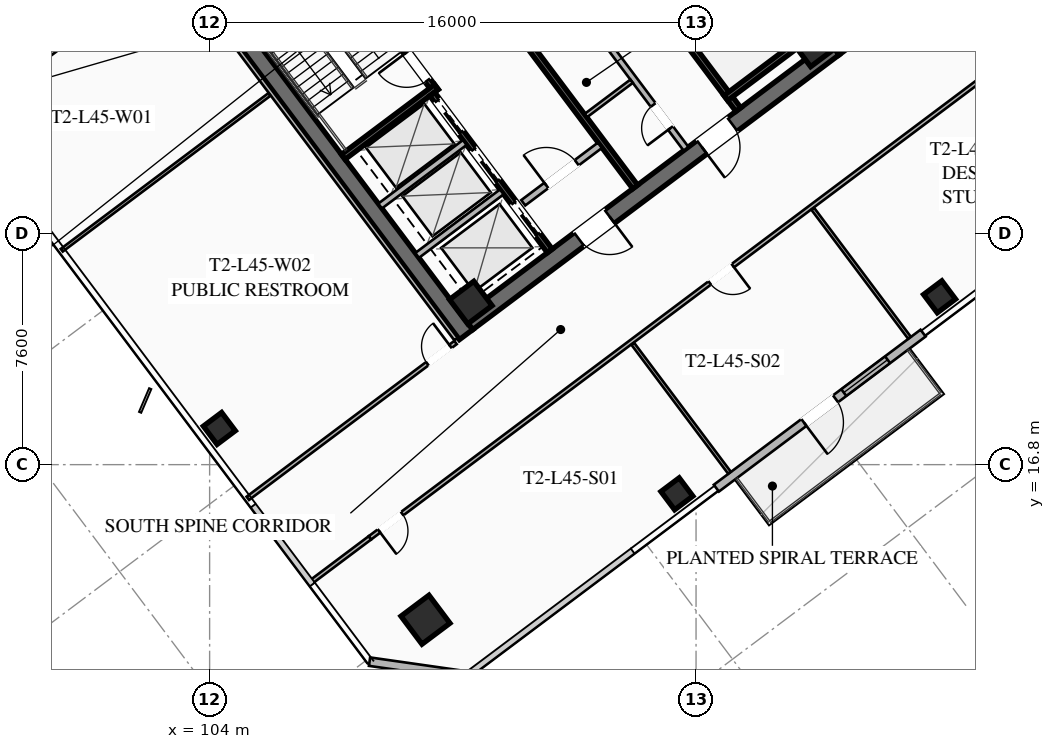
"""IFC4 building model, lengths in metres.
Left out: names, types, materials, properties, quantities, classifications, styles, units other than length and angle.
Written with IfcOpenShell. Run it as: python <this file> out.ifc"""

import sys

from ifc_helpers import new_model, si_unit, direction, frame, frame_2d, origin, origin_2d, place, context, subcontext, project, spatial, rectangle, hollow_rectangle, extrude, element, fill, save


model = new_model("IFC4")
c1 = context("Model", 3, precision=1e-05, world=origin(), true_north=direction((0.0, 1.0)))
c2 = subcontext(c1, "Body", "Model", "MODEL_VIEW")
j1 = project(units=[si_unit("LENGTHUNIT", "METRE"), si_unit("PLANEANGLEUNIT", "RADIAN")], contexts=[c1])
p1 = place(None, origin())
s1 = spatial("IfcSite", under=j1, at=p1, CompositionType="ELEMENT")
p2 = place(p1, origin())
s2 = spatial("IfcBuilding", under=s1, at=p2, CompositionType="ELEMENT")
p3 = place(p2, frame((0.0, 0.0, 167.65)))
s3 = spatial("IfcBuildingStorey", under=s2, at=p3, CompositionType="ELEMENT", Elevation=167.65)
for number, where, z_axis, x_axis in (
    (1, (112.436, 21.077, 0.0), (0.0, 0.0, 1.0), (-0.6, 0.8, 0.0)),
    (2, (115.564, 42.923, 0.0), (0.0, 0.0, 1.0), (0.6, -0.8, 0.0)),
):
    element("IfcWall", number, at=place(p3, frame(where, z_axis=z_axis, x_axis=x_axis)), inside=s3, PredefinedType="SHEAR", context=c2, shape_type="SweptSolid", body=[
        extrude(rectangle(XDim=15.6, YDim=0.55, at=frame_2d((7.8, 0.0))), origin(), (0.0, 0.0, 1.0), 3.55),
    ])
p4 = place(p3, frame((124.539, 30.498, 0.0), z_axis=(0.0, 0.0, 1.0), x_axis=(-0.799998054672, -0.600002593761, 0.0)))
e3 = element("IfcWall", 3, at=p4, inside=s3, PredefinedType="SHEAR", context=c2, shape_type="SweptSolid", body=[
    extrude(rectangle(XDim=15.06, YDim=0.55, at=frame_2d((7.53, 0.0))), origin(), (0.0, 0.0, 1.0), 3.55),
])
p5 = place(p4, frame((9.23, 0.0, 0.0)))
e4 = element("IfcOpeningElement", 4, at=p5, cuts=e3, PredefinedType="OPENING", context=c2, shape_type="SweptSolid", body=[
    extrude(rectangle(XDim=1.25, YDim=2.25, at=frame_2d((0.625, 1.125))), frame((0.0, 0.285, 0.0), z_axis=(0.0, -1.0, 0.0), x_axis=(1.0, 0.0, 0.0)), (0.0, 0.0, 1.0), 0.57),
])
p6 = place(p4, frame((4.18, 0.0, 0.0)))
e5 = element("IfcOpeningElement", 5, at=p6, cuts=e3, PredefinedType="OPENING", context=c2, shape_type="SweptSolid", body=[
    extrude(rectangle(XDim=1.25, YDim=2.25, at=frame_2d((0.625, 1.125))), frame((0.0, 0.285, 0.0), z_axis=(0.0, -1.0, 0.0), x_axis=(1.0, 0.0, 0.0)), (0.0, 0.0, 1.0), 0.57),
])
for number, where, z_axis, x_axis in (
    (6, (112.59, 22.13, 0.0), (0.0, 0.0, 1.0), (0.8, 0.6, 0.0)),
    (7, (123.87, 30.59, 0.0), (0.0, 0.0, 1.0), (0.8, 0.6, 0.0)),
):
    element("IfcColumn", number, at=place(p3, frame(where, z_axis=z_axis, x_axis=x_axis)), inside=s3, PredefinedType="COLUMN", context=c2, shape_type="SweptSolid", body=[
        extrude(hollow_rectangle(XDim=1.0, YDim=1.0, WallThickness=0.04, at=origin_2d()), origin(), (0.0, 0.0, 1.0), 3.37),
    ])
p7 = place(p3, frame((111.1, 11.7, 0.0), z_axis=(0.0, 0.0, 1.0), x_axis=(0.799999996291, 0.600000004945, 0.0)))
e8 = element("IfcColumn", 8, at=p7, inside=s3, PredefinedType="COLUMN", context=c2, shape_type="SweptSolid", body=[
    extrude(hollow_rectangle(XDim=1.15, YDim=1.15, WallThickness=0.045, at=origin_2d()), origin(), (0.0, 0.0, 1.0), 3.37),
])
for number, where, z_axis, x_axis in (
    (9, (119.37, 15.84, 0.0), (0.0, 0.0, 1.0), (0.8, 0.6, 0.0)),
    (10, (128.01, 22.32, 0.0), (0.0, 0.0, 1.0), (0.8, 0.6, 0.0)),
    (11, (104.32, 17.99, 0.0), (0.0, 0.0, 1.0), (0.8, 0.6, 0.0)),
):
    element("IfcColumn", number, at=place(p3, frame(where, z_axis=z_axis, x_axis=x_axis)), inside=s3, PredefinedType="COLUMN", context=c2, shape_type="SweptSolid", body=[
        extrude(hollow_rectangle(XDim=0.75, YDim=0.75, WallThickness=0.032, at=origin_2d()), origin(), (0.0, 0.0, 1.0), 3.37),
    ])
p8 = place(p3, frame((127.468, 21.126, 0.0), z_axis=(0.0, 0.0, 1.0), x_axis=(-0.799996553335, -0.600004595526, 0.0)))
e12 = element("IfcWall", 12, at=p8, inside=s3, PredefinedType="SOLIDWALL", context=c2, shape_type="SweptSolid", body=[
    extrude(rectangle(XDim=8.5, YDim=0.28, at=frame_2d((4.25, 0.0))), origin(), (0.0, 0.0, 1.0), 3.37),
])
p9 = place(p8, frame((3.6, 0.0, 0.0)))
e13 = element("IfcOpeningElement", 13, at=p9, cuts=e12, PredefinedType="OPENING", context=c2, shape_type="SweptSolid", body=[
    extrude(rectangle(XDim=1.3, YDim=2.15, at=frame_2d((0.65, 1.075))), frame((0.0, 0.15, 0.0), z_axis=(0.0, -1.0, 0.0), x_axis=(1.0, 0.0, 0.0)), (0.0, 0.0, 1.0), 0.3),
])
p10 = place(p8, frame((1.46, 0.0, 0.85)))
e14 = element("IfcOpeningElement", 14, at=p10, cuts=e12, PredefinedType="OPENING", context=c2, shape_type="SweptSolid", body=[
    extrude(rectangle(XDim=1.8, YDim=1.92, at=frame_2d((0.9, 0.96))), frame((0.0, 0.15, 0.0), z_axis=(0.0, -1.0, 0.0), x_axis=(1.0, 0.0, 0.0)), (0.0, 0.0, 1.0), 0.3),
])
p11 = place(p3, frame((112.48, 9.86, 0.0), z_axis=(0.0, 0.0, 1.0), x_axis=(-0.989950994782, 0.141410847992, 0.0)))
e15 = element("IfcWall", 15, at=p11, inside=s3, PredefinedType="SOLIDWALL", context=c2, shape_type="SweptSolid", body=[
    extrude(rectangle(XDim=3.253, YDim=0.28, at=frame_2d((1.626, 0.0))), origin(), (0.0, 0.0, 1.0), 3.37),
])
p12 = place(p3, frame((111.44, 29.08, 0.0), z_axis=(0.0, 0.0, 1.0), x_axis=(-0.59999029481, 0.8000072788, 0.0)))
e16 = element("IfcWall", 16, at=p12, inside=s3, PredefinedType="SHEAR", context=c2, shape_type="SweptSolid", body=[
    extrude(rectangle(XDim=8.05, YDim=0.2, at=frame_2d((4.025, 0.0))), origin(), (0.0, 0.0, 1.0), 3.37),
])
p13 = place(p12, frame((0.45, 0.0, 0.0)))
e17 = element("IfcOpeningElement", 17, at=p13, cuts=e16, PredefinedType="OPENING", context=c2, shape_type="SweptSolid", body=[
    extrude(rectangle(XDim=1.15, YDim=2.2, at=frame_2d((0.575, 1.1))), frame((0.0, 0.11, 0.0), z_axis=(0.0, -1.0, 0.0), x_axis=(1.0, 0.0, 0.0)), (0.0, 0.0, 1.0), 0.22),
])
p14 = place(p3, frame((108.396, 26.922, 0.0), z_axis=(0.0, 0.0, 1.0), x_axis=(0.800015298837, 0.599979601008, 0.0)))
e18 = element("IfcWall", 18, at=p14, inside=s3, PredefinedType="SHEAR", context=c2, shape_type="SweptSolid", body=[
    extrude(rectangle(XDim=3.83, YDim=0.2, at=frame_2d((1.915, 0.0))), origin(), (0.0, 0.0, 1.0), 3.37),
])
p15 = place(p3, frame((116.56, 34.92, 0.0), z_axis=(0.0, 0.0, 1.0), x_axis=(0.59999029481, -0.8000072788, 0.0)))
e19 = element("IfcWall", 19, at=p15, inside=s3, PredefinedType="SHEAR", context=c2, shape_type="SweptSolid", body=[
    extrude(rectangle(XDim=8.05, YDim=0.2, at=frame_2d((4.025, 0.0))), origin(), (0.0, 0.0, 1.0), 3.37),
])
p16 = place(p15, frame((0.45, 0.0, 0.0)))
e20 = element("IfcOpeningElement", 20, at=p16, cuts=e19, PredefinedType="OPENING", context=c2, shape_type="SweptSolid", body=[
    extrude(rectangle(XDim=1.15, YDim=2.2, at=frame_2d((0.575, 1.1))), frame((0.0, 0.11, 0.0), z_axis=(0.0, -1.0, 0.0), x_axis=(1.0, 0.0, 0.0)), (0.0, 0.0, 1.0), 0.22),
])
p17 = place(p3, frame((120.98, 28.86, 0.0), z_axis=(0.0, 0.0, 1.0), x_axis=(0.800015298837, 0.599979601008, 0.0)))
e21 = element("IfcWall", 21, at=p17, inside=s3, PredefinedType="SHEAR", context=c2, shape_type="SweptSolid", body=[
    extrude(rectangle(XDim=3.83, YDim=0.2, at=frame_2d((1.915, 0.0))), origin(), (0.0, 0.0, 1.0), 3.37),
])
p18 = place(p3, frame((117.998, 25.936, 0.0), z_axis=(0.0, 0.0, 1.0), x_axis=(-0.600002693989, 0.799997979501, 0.0)))
e22 = element("IfcWall", 22, at=p18, inside=s3, PredefinedType="SHEAR", context=c2, shape_type="SweptSolid", body=[
    extrude(rectangle(XDim=14.5, YDim=0.2, at=frame_2d((7.25, 0.0))), origin(), (0.0, 0.0, 1.0), 3.37),
])
p19 = place(p3, frame((114.316, 25.412, 0.0), z_axis=(0.0, 0.0, 1.0), x_axis=(0.800018601094, 0.59997519774, 0.0)))
e23 = element("IfcWall", 23, at=p19, inside=s3, PredefinedType="SOLIDWALL", context=c2, shape_type="SweptSolid", body=[
    extrude(rectangle(XDim=3.15, YDim=0.22, at=frame_2d((1.575, 0.0))), origin(), (0.0, 0.0, 1.0), 2.723),
])
p20 = place(p19, frame((0.95, 0.0, 0.0)))
e24 = element("IfcOpeningElement", 24, at=p20, cuts=e23, PredefinedType="OPENING", context=c2, shape_type="SweptSolid", body=[
    extrude(rectangle(XDim=1.25, YDim=2.25, at=frame_2d((0.625, 1.125))), frame((0.0, 0.12, 0.0), z_axis=(0.0, -1.0, 0.0), x_axis=(1.0, 0.0, 0.0)), (0.0, 0.0, 1.0), 0.24),
])
p21 = place(p3, frame((115.19, 23.83, 0.0), z_axis=(0.0, 0.0, 1.0), x_axis=(-0.599993943644, 0.800004542231, 0.0)))
e25 = element("IfcWall", 25, at=p21, inside=s3, PredefinedType="SHEAR", context=c2, shape_type="SweptSolid", body=[
    extrude(rectangle(XDim=6.45, YDim=0.2, at=frame_2d((3.225, 0.0))), origin(), (0.0, 0.0, 1.0), 3.37),
])
p22 = place(p21, frame((4.875, 0.0, 0.0)))
e26 = element("IfcOpeningElement", 26, at=p22, cuts=e25, PredefinedType="OPENING", context=c2, shape_type="SweptSolid", body=[
    extrude(rectangle(XDim=1.3, YDim=2.25, at=frame_2d((0.65, 1.125))), frame((0.0, 0.11, 0.0), z_axis=(0.0, -1.0, 0.0), x_axis=(1.0, 0.0, 0.0)), (0.0, 0.0, 1.0), 0.22),
])
p23 = place(p21, frame((2.875, 0.0, 0.0)))
e27 = element("IfcOpeningElement", 27, at=p23, cuts=e25, PredefinedType="OPENING", context=c2, shape_type="SweptSolid", body=[
    extrude(rectangle(XDim=1.3, YDim=2.25, at=frame_2d((0.65, 1.125))), frame((0.0, 0.11, 0.0), z_axis=(0.0, -1.0, 0.0), x_axis=(1.0, 0.0, 0.0)), (0.0, 0.0, 1.0), 0.22),
])
p24 = place(p21, frame((0.675, 0.0, 0.0)))
e28 = element("IfcOpeningElement", 28, at=p24, cuts=e25, PredefinedType="OPENING", context=c2, shape_type="SweptSolid", body=[
    extrude(rectangle(XDim=1.3, YDim=2.25, at=frame_2d((0.65, 1.125))), frame((0.0, 0.11, 0.0), z_axis=(0.0, -1.0, 0.0), x_axis=(1.0, 0.0, 0.0)), (0.0, 0.0, 1.0), 0.22),
])
for number, where, z_axis, x_axis in (
    (29, (110.826, 23.682, 0.0), (0.0, 0.0, 1.0), (0.8, 0.6, 0.0)),
    (30, (109.608, 25.306, 0.0), (0.0, 0.0, 1.0), (0.8, 0.6, 0.0)),
):
    element("IfcWall", number, at=place(p3, frame(where, z_axis=z_axis, x_axis=x_axis)), inside=s3, PredefinedType="SOLIDWALL", context=c2, shape_type="SweptSolid", body=[
        extrude(rectangle(XDim=3.48, YDim=0.2, at=frame_2d((1.74, 0.0))), origin(), (0.0, 0.0, 1.0), 3.37),
    ])
p25 = place(p3, frame((119.67, 27.19, 0.0), z_axis=(0.0, 0.0, 1.0), x_axis=(-0.599988677396, 0.800008491828, 0.0)))
e31 = element("IfcWall", 31, at=p25, inside=s3, PredefinedType="SOLIDWALL", context=c2, shape_type="SweptSolid", body=[
    extrude(rectangle(XDim=6.9, YDim=0.2, at=frame_2d((3.45, 0.0))), origin(), (0.0, 0.0, 1.0), 2.723),
])
p26 = place(p25, frame((0.85, 0.0, 0.0)))
e32 = element("IfcOpeningElement", 32, at=p26, cuts=e31, PredefinedType="OPENING", context=c2, shape_type="SweptSolid", body=[
    extrude(rectangle(XDim=0.95, YDim=2.05, at=frame_2d((0.475, 1.025))), frame((0.0, 0.11, 0.0), z_axis=(0.0, -1.0, 0.0), x_axis=(1.0, 0.0, 0.0)), (0.0, 0.0, 1.0), 0.22),
])
p27 = place(p25, frame((4.8, 0.0, 0.0)))
e33 = element("IfcOpeningElement", 33, at=p27, cuts=e31, PredefinedType="OPENING", context=c2, shape_type="SweptSolid", body=[
    extrude(rectangle(XDim=1.05, YDim=2.2, at=frame_2d((0.525, 1.1))), frame((0.0, 0.11, 0.0), z_axis=(0.0, -1.0, 0.0), x_axis=(1.0, 0.0, 0.0)), (0.0, 0.0, 1.0), 0.22),
])
p28 = place(p3, frame((116.376, 28.282, 0.0), z_axis=(0.0, 0.0, 1.0), x_axis=(0.8, 0.6, 0.0)))
e34 = element("IfcWall", 34, at=p28, inside=s3, PredefinedType="PARTITIONING", context=c2, shape_type="SweptSolid", body=[
    extrude(rectangle(XDim=1.88, YDim=0.135, at=frame_2d((0.94, 0.0))), origin(), (0.0, 0.0, 1.0), 2.723),
])
p29 = place(p3, frame((132.23, 31.61, 0.0), z_axis=(0.0, 0.0, 1.0), x_axis=(-0.799995916807, -0.600005444218, 0.0)))
e35 = element("IfcWall", 35, at=p29, inside=s3, PredefinedType="PARTITIONING", context=c2, shape_type="SweptSolid", body=[
    extrude(rectangle(XDim=28.7, YDim=0.135, at=frame_2d((14.35, 0.0))), origin(), (0.0, 0.0, 1.0), 2.723),
])
p30 = place(p29, frame((27.37, 0.0, 0.0)))
e36 = element("IfcOpeningElement", 36, at=p30, cuts=e35, PredefinedType="OPENING", context=c2, shape_type="SweptSolid", body=[
    extrude(rectangle(XDim=0.95, YDim=2.05, at=frame_2d((0.475, 1.025))), frame((0.0, 0.077, 0.0), z_axis=(0.0, -1.0, 0.0), x_axis=(1.0, 0.0, 0.0)), (0.0, 0.0, 1.0), 0.155),
])
p31 = place(p29, frame((13.775, 0.0, 0.0)))
e37 = element("IfcOpeningElement", 37, at=p31, cuts=e35, PredefinedType="OPENING", context=c2, shape_type="SweptSolid", body=[
    extrude(rectangle(XDim=0.95, YDim=2.05, at=frame_2d((0.475, 1.025))), frame((0.0, 0.077, 0.0), z_axis=(0.0, -1.0, 0.0), x_axis=(1.0, 0.0, 0.0)), (0.0, 0.0, 1.0), 0.155),
])
p32 = place(p29, frame((0.38, 0.0, 0.0)))
e38 = element("IfcOpeningElement", 38, at=p32, cuts=e35, PredefinedType="OPENING", context=c2, shape_type="SweptSolid", body=[
    extrude(rectangle(XDim=0.95, YDim=2.05, at=frame_2d((0.475, 1.025))), frame((0.0, 0.077, 0.0), z_axis=(0.0, -1.0, 0.0), x_axis=(1.0, 0.0, 0.0)), (0.0, 0.0, 1.0), 0.155),
])
p33 = place(p3, frame((107.326, 12.932, 0.0), z_axis=(0.0, 0.0, 1.0), x_axis=(0.800012055778, 0.599983925293, 0.0)))
e39 = element("IfcWall", 39, at=p33, inside=s3, PredefinedType="PARTITIONING", context=c2, shape_type="SweptSolid", body=[
    extrude(rectangle(XDim=2.43, YDim=0.135, at=frame_2d((1.215, 0.0))), origin(), (0.0, 0.0, 1.0), 2.723),
])
for number, where, z_axis, x_axis in (
    (40, (121.098, 16.536, 0.0), (0.0, 0.0, 1.0), (-0.6, 0.8, 0.0)),
    (41, (127.018, 20.976, 0.0), (0.0, 0.0, 1.0), (-0.6, 0.8, 0.0)),
):
    element("IfcWall", number, at=place(p3, frame(where, z_axis=z_axis, x_axis=x_axis)), inside=s3, PredefinedType="PARTITIONING", context=c2, shape_type="SweptSolid", body=[
        extrude(rectangle(XDim=5.3, YDim=0.11, at=frame_2d((2.65, 0.0))), origin(), (0.0, 0.0, 1.0), 2.723),
    ])
p34 = place(p3, frame((112.104, 20.928, 0.0), z_axis=(0.0, 0.0, 1.0), x_axis=(-0.599994940075, 0.800003794918, 0.0)))
e42 = element("IfcWall", 42, at=p34, inside=s3, PredefinedType="PARTITIONING", context=c2, shape_type="SweptSolid", body=[
    extrude(rectangle(XDim=15.44, YDim=0.135, at=frame_2d((7.72, 0.0))), origin(), (0.0, 0.0, 1.0), 2.723),
])
p35 = place(p3, frame((102.728, 33.296, 0.0), z_axis=(0.0, 0.0, 1.0), x_axis=(-0.800013722153, -0.59998170336, 0.0)))
e43 = element("IfcWall", 43, at=p35, inside=s3, PredefinedType="PARTITIONING", context=c2, shape_type="SweptSolid", body=[
    extrude(rectangle(XDim=8.54, YDim=0.135, at=frame_2d((4.27, 0.0))), origin(), (0.0, 0.0, 1.0), 2.723),
])
p36 = place(p35, frame((0.5, 0.0, 0.0)))
e44 = element("IfcOpeningElement", 44, at=p36, cuts=e43, PredefinedType="OPENING", context=c2, shape_type="SweptSolid", body=[
    extrude(rectangle(XDim=0.95, YDim=2.05, at=frame_2d((0.475, 1.025))), frame((0.0, 0.077, 0.0), z_axis=(0.0, -1.0, 0.0), x_axis=(1.0, 0.0, 0.0)), (0.0, 0.0, 1.0), 0.155),
])
p37 = place(p3, frame((105.256, 15.692, 0.0), z_axis=(0.0, 0.0, 1.0), x_axis=(0.799989708052, 0.600013722352, 0.0)))
e45 = element("IfcWall", 45, at=p37, inside=s3, PredefinedType="PARTITIONING", context=c2, shape_type="SweptSolid", body=[
    extrude(rectangle(XDim=8.54, YDim=0.135, at=frame_2d((4.27, 0.0))), origin(), (0.0, 0.0, 1.0), 2.723),
])
p38 = place(p37, frame((7.38, 0.0, 0.0)))
e46 = element("IfcOpeningElement", 46, at=p38, cuts=e45, PredefinedType="OPENING", context=c2, shape_type="SweptSolid", body=[
    extrude(rectangle(XDim=0.95, YDim=2.05, at=frame_2d((0.475, 1.025))), frame((0.0, 0.077, 0.0), z_axis=(0.0, -1.0, 0.0), x_axis=(1.0, 0.0, 0.0)), (0.0, 0.0, 1.0), 0.155),
])
p39 = place(p3, frame((99.136, 23.852, 0.0), z_axis=(0.0, 0.0, 1.0), x_axis=(0.8, 0.6, 0.0)))
e47 = element("IfcWall", 47, at=p39, inside=s3, PredefinedType="PARTITIONING", context=c2, shape_type="SweptSolid", body=[
    extrude(rectangle(XDim=8.54, YDim=0.11, at=frame_2d((4.27, 0.0))), origin(), (0.0, 0.0, 1.0), 2.723),
])
p40 = place(p9, origin())
e48 = element("IfcDoor", 48, at=p40, inside=s3, OperationType="SINGLE_SWING_RIGHT", PredefinedType="DOOR", context=c2, shape_type="SweptSolid", body=[
    extrude(rectangle(XDim=1.3, YDim=2.15, at=frame_2d((0.65, 1.075))), frame((0.0, 0.025, 0.0), z_axis=(0.0, -1.0, 0.0), x_axis=(1.0, 0.0, 0.0)), (0.0, 0.0, 1.0), 0.05),
])
fill(e13, e48)
p41 = place(p10, origin())
e49 = element("IfcWindow", 49, at=p41, inside=s3, PartitioningType="SINGLE_PANEL", PredefinedType="WINDOW", context=c2, shape_type="SweptSolid", body=[
    extrude(rectangle(XDim=1.8, YDim=1.92, at=frame_2d((0.9, 0.96))), frame((0.0, 0.03, 0.0), z_axis=(0.0, -1.0, 0.0), x_axis=(1.0, 0.0, 0.0)), (0.0, 0.0, 1.0), 0.06),
])
fill(e14, e49)
p42 = place(p5, origin())
e50 = element("IfcDoor", 50, at=p42, inside=s3, OperationType="SINGLE_SWING_LEFT", PredefinedType="DOOR", context=c2, shape_type="SweptSolid", body=[
    extrude(rectangle(XDim=1.25, YDim=2.25, at=frame_2d((0.625, 1.125))), frame((0.0, 0.025, 0.0), z_axis=(0.0, -1.0, 0.0), x_axis=(1.0, 0.0, 0.0)), (0.0, 0.0, 1.0), 0.05),
])
fill(e4, e50)
p43 = place(p6, origin())
e51 = element("IfcDoor", 51, at=p43, inside=s3, OperationType="SINGLE_SWING_RIGHT", PredefinedType="DOOR", context=c2, shape_type="SweptSolid", body=[
    extrude(rectangle(XDim=1.25, YDim=2.25, at=frame_2d((0.625, 1.125))), frame((0.0, 0.025, 0.0), z_axis=(0.0, -1.0, 0.0), x_axis=(1.0, 0.0, 0.0)), (0.0, 0.0, 1.0), 0.05),
])
fill(e5, e51)
p44 = place(p13, origin())
e52 = element("IfcDoor", 52, at=p44, inside=s3, OperationType="SINGLE_SWING_RIGHT", PredefinedType="DOOR", context=c2, shape_type="SweptSolid", body=[
    extrude(rectangle(XDim=1.15, YDim=2.2, at=frame_2d((0.575, 1.1))), frame((0.0, 0.025, 0.0), z_axis=(0.0, -1.0, 0.0), x_axis=(1.0, 0.0, 0.0)), (0.0, 0.0, 1.0), 0.05),
])
fill(e17, e52)
p45 = place(p20, origin())
e53 = element("IfcDoor", 53, at=p45, inside=s3, OperationType="SINGLE_SWING_LEFT", PredefinedType="DOOR", context=c2, shape_type="SweptSolid", body=[
    extrude(rectangle(XDim=1.25, YDim=2.25, at=frame_2d((0.625, 1.125))), frame((0.0, 0.025, 0.0), z_axis=(0.0, -1.0, 0.0), x_axis=(1.0, 0.0, 0.0)), (0.0, 0.0, 1.0), 0.05),
])
fill(e24, e53)
p46 = place(p26, origin())
e54 = element("IfcDoor", 54, at=p46, inside=s3, OperationType="SINGLE_SWING_LEFT", PredefinedType="DOOR", context=c2, shape_type="SweptSolid", body=[
    extrude(rectangle(XDim=0.95, YDim=2.05, at=frame_2d((0.475, 1.025))), frame((0.0, 0.025, 0.0), z_axis=(0.0, -1.0, 0.0), x_axis=(1.0, 0.0, 0.0)), (0.0, 0.0, 1.0), 0.05),
])
fill(e32, e54)
p47 = place(p30, origin())
e55 = element("IfcDoor", 55, at=p47, inside=s3, OperationType="SINGLE_SWING_RIGHT", PredefinedType="DOOR", context=c2, shape_type="SweptSolid", body=[
    extrude(rectangle(XDim=0.95, YDim=2.05, at=frame_2d((0.475, 1.025))), frame((0.0, 0.025, 0.0), z_axis=(0.0, -1.0, 0.0), x_axis=(1.0, 0.0, 0.0)), (0.0, 0.0, 1.0), 0.05),
])
fill(e36, e55)
p48 = place(p31, origin())
e56 = element("IfcDoor", 56, at=p48, inside=s3, OperationType="SINGLE_SWING_LEFT", PredefinedType="DOOR", context=c2, shape_type="SweptSolid", body=[
    extrude(rectangle(XDim=0.95, YDim=2.05, at=frame_2d((0.475, 1.025))), frame((0.0, 0.025, 0.0), z_axis=(0.0, -1.0, 0.0), x_axis=(1.0, 0.0, 0.0)), (0.0, 0.0, 1.0), 0.05),
])
fill(e37, e56)
p49 = place(p38, origin())
e57 = element("IfcDoor", 57, at=p49, inside=s3, OperationType="SINGLE_SWING_RIGHT", PredefinedType="DOOR", context=c2, shape_type="SweptSolid", body=[
    extrude(rectangle(XDim=0.95, YDim=2.05, at=frame_2d((0.475, 1.025))), frame((0.0, 0.025, 0.0), z_axis=(0.0, -1.0, 0.0), x_axis=(1.0, 0.0, 0.0)), (0.0, 0.0, 1.0), 0.05),
])
fill(e46, e57)
p50 = place(p22, origin())
e58 = element("IfcDoor", 58, at=p50, inside=s3, OperationType="SLIDING_TO_LEFT", PredefinedType="DOOR", context=c2, shape_type="SweptSolid", body=[
    extrude(rectangle(XDim=1.3, YDim=2.25, at=frame_2d((0.65, 1.125))), frame((0.0, 0.025, 0.0), z_axis=(0.0, -1.0, 0.0), x_axis=(1.0, 0.0, 0.0)), (0.0, 0.0, 1.0), 0.05),
])
fill(e26, e58)
p51 = place(p23, origin())
e59 = element("IfcDoor", 59, at=p51, inside=s3, OperationType="SLIDING_TO_LEFT", PredefinedType="DOOR", context=c2, shape_type="SweptSolid", body=[
    extrude(rectangle(XDim=1.3, YDim=2.25, at=frame_2d((0.65, 1.125))), frame((0.0, 0.025, 0.0), z_axis=(0.0, -1.0, 0.0), x_axis=(1.0, 0.0, 0.0)), (0.0, 0.0, 1.0), 0.05),
])
fill(e27, e59)
p52 = place(p24, origin())
e60 = element("IfcDoor", 60, at=p52, inside=s3, OperationType="SLIDING_TO_LEFT", PredefinedType="DOOR", context=c2, shape_type="SweptSolid", body=[
    extrude(rectangle(XDim=1.3, YDim=2.25, at=frame_2d((0.65, 1.125))), frame((0.0, 0.025, 0.0), z_axis=(0.0, -1.0, 0.0), x_axis=(1.0, 0.0, 0.0)), (0.0, 0.0, 1.0), 0.05),
])
fill(e28, e60)
save(model, sys.argv[1])
